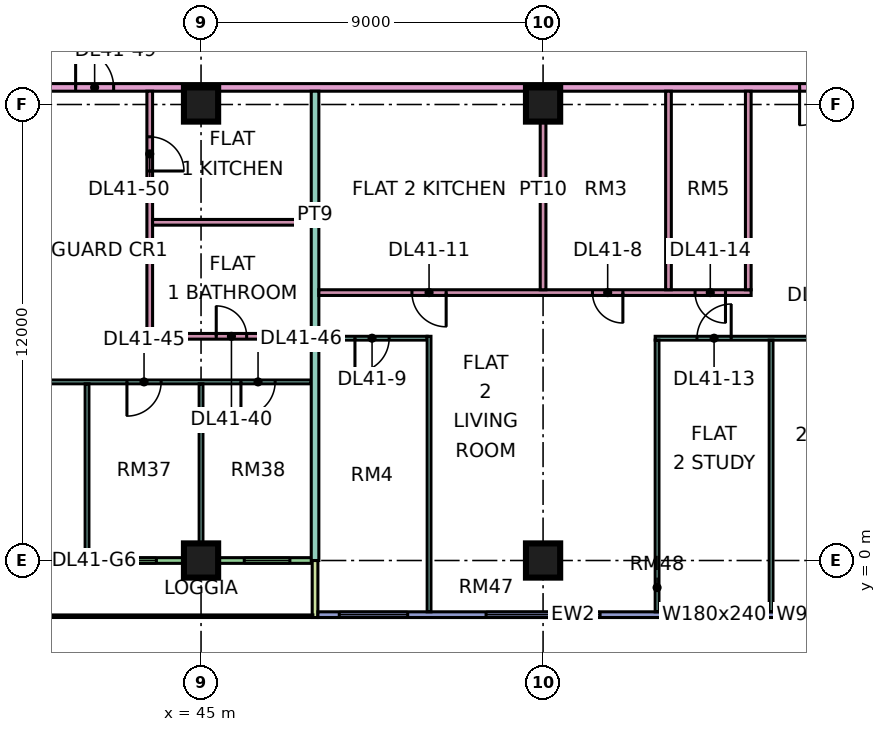
"""IFC4 building model, lengths in metres.
Left out: names, types, materials, properties, quantities, classifications, styles, units other than length and angle.
Written with IfcOpenShell. Run it as: python <this file> out.ifc"""

import sys

from ifc_helpers import new_model, si_unit, direction, frame, frame_2d, origin, origin_2d, place, context, subcontext, project, spatial, rectangle, extrude, element, fill, save


model = new_model("IFC4")
c1 = context("Model", 3, precision=1e-05, world=origin(), true_north=direction((0.0, 1.0)))
c2 = subcontext(c1, "Body", "Model", "MODEL_VIEW")
j1 = project(units=[si_unit("LENGTHUNIT", "METRE"), si_unit("PLANEANGLEUNIT", "RADIAN")], contexts=[c1])
p1 = place(None, origin())
s1 = spatial("IfcSite", under=j1, at=p1, CompositionType="ELEMENT")
p2 = place(p1, origin())
s2 = spatial("IfcBuilding", under=s1, at=p2, CompositionType="ELEMENT")
p3 = place(p2, frame((0.0, 0.0, 179.9)))
s3 = spatial("IfcBuildingStorey", under=s2, at=p3, CompositionType="ELEMENT", Elevation=179.9)
for number, where, z_axis, x_axis in (
    (1, (45.0, 0.0, 0.0), (0.0, 0.0, 1.0), (1.0, 0.0, 0.0)),
    (2, (45.0, 12.0, 0.0), (0.0, 0.0, 1.0), (1.0, 0.0, 0.0)),
    (3, (54.0, 0.0, 0.0), (0.0, 0.0, 1.0), (1.0, 0.0, 0.0)),
    (4, (54.0, 12.0, 0.0), (0.0, 0.0, 1.0), (1.0, 0.0, 0.0)),
):
    element("IfcColumn", number, at=place(p3, frame(where, z_axis=z_axis, x_axis=x_axis)), inside=s3, PredefinedType="COLUMN", context=c2, shape_type="SweptSolid", body=[
        extrude(rectangle(XDim=0.9, YDim=0.9, at=origin_2d()), origin(), (0.0, 0.0, 1.0), 3.75),
    ])
p4 = place(p3, frame((36.075, 0.0, 0.0), z_axis=(0.0, 0.0, 1.0), x_axis=(1.0, 0.0, 0.0)))
e5 = element("IfcWall", 5, at=p4, inside=s3, PredefinedType="SOLIDWALL", context=c2, shape_type="SweptSolid", body=[
    extrude(rectangle(XDim=11.85, YDim=0.15, at=frame_2d((5.925, 0.0))), origin(), (0.0, 0.0, 1.0), 3.35),
])
p5 = place(p4, frame((2.3, 0.0, 0.0)))
e6 = element("IfcOpeningElement", 6, at=p5, cuts=e5, PredefinedType="OPENING", context=c2, shape_type="SweptSolid", body=[
    extrude(rectangle(XDim=1.8, YDim=2.4, at=frame_2d((0.9, 1.2))), frame((0.0, 0.085, 0.0), z_axis=(0.0, -1.0, 0.0), x_axis=(1.0, 0.0, 0.0)), (0.0, 0.0, 1.0), 0.17),
])
p6 = place(p4, frame((6.55, 0.0, 0.45)))
e7 = element("IfcOpeningElement", 7, at=p6, cuts=e5, PredefinedType="OPENING", context=c2, shape_type="SweptSolid", body=[
    extrude(rectangle(XDim=1.2, YDim=2.4, at=frame_2d((0.6, 1.2))), frame((0.0, 0.085, 0.0), z_axis=(0.0, -1.0, 0.0), x_axis=(1.0, 0.0, 0.0)), (0.0, 0.0, 1.0), 0.17),
])
p7 = place(p4, frame((10.062, 0.0, 0.45)))
e8 = element("IfcOpeningElement", 8, at=p7, cuts=e5, PredefinedType="OPENING", context=c2, shape_type="SweptSolid", body=[
    extrude(rectangle(XDim=1.2, YDim=2.4, at=frame_2d((0.6, 1.2))), frame((0.0, 0.085, 0.0), z_axis=(0.0, -1.0, 0.0), x_axis=(1.0, 0.0, 0.0)), (0.0, 0.0, 1.0), 0.17),
])
p8 = place(p3, frame((48.0, -1.5, 0.0), z_axis=(0.0, 0.0, 1.0), x_axis=(0.0, 1.0, 0.0)))
e9 = element("IfcWall", 9, at=p8, inside=s3, PredefinedType="SOLIDWALL", context=c2, shape_type="SweptSolid", body=[
    extrude(rectangle(XDim=1.5, YDim=0.15, at=frame_2d((0.75, 0.0))), origin(), (0.0, 0.0, 1.0), 3.35),
])
p9 = place(p3, frame((48.075, -1.425, 0.0), z_axis=(0.0, 0.0, 1.0), x_axis=(1.0, 0.0, 0.0)))
e10 = element("IfcWall", 10, at=p9, inside=s3, PredefinedType="SOLIDWALL", context=c2, shape_type="SweptSolid", body=[
    extrude(rectangle(XDim=13.425, YDim=0.15, at=frame_2d((6.712, 0.0))), origin(), (0.0, 0.0, 1.0), 3.35),
])
p10 = place(p9, frame((0.562, 0.0, 0.45)))
e11 = element("IfcOpeningElement", 11, at=p10, cuts=e10, PredefinedType="OPENING", context=c2, shape_type="SweptSolid", body=[
    extrude(rectangle(XDim=1.8, YDim=2.4, at=frame_2d((0.9, 1.2))), frame((0.0, 0.085, 0.0), z_axis=(0.0, -1.0, 0.0), x_axis=(1.0, 0.0, 0.0)), (0.0, 0.0, 1.0), 0.17),
])
p11 = place(p9, frame((4.425, 0.0, 0.45)))
e12 = element("IfcOpeningElement", 12, at=p11, cuts=e10, PredefinedType="OPENING", context=c2, shape_type="SweptSolid", body=[
    extrude(rectangle(XDim=3.0, YDim=2.4, at=frame_2d((1.5, 1.2))), frame((0.0, 0.085, 0.0), z_axis=(0.0, -1.0, 0.0), x_axis=(1.0, 0.0, 0.0)), (0.0, 0.0, 1.0), 0.17),
])
p12 = place(p9, frame((9.525, 0.0, 0.45)))
e13 = element("IfcOpeningElement", 13, at=p12, cuts=e10, PredefinedType="OPENING", context=c2, shape_type="SweptSolid", body=[
    extrude(rectangle(XDim=1.8, YDim=2.4, at=frame_2d((0.9, 1.2))), frame((0.0, 0.085, 0.0), z_axis=(0.0, -1.0, 0.0), x_axis=(1.0, 0.0, 0.0)), (0.0, 0.0, 1.0), 0.17),
])
p13 = place(p9, frame((12.225, 0.0, 0.45)))
e14 = element("IfcOpeningElement", 14, at=p13, cuts=e10, PredefinedType="OPENING", context=c2, shape_type="SweptSolid", body=[
    extrude(rectangle(XDim=0.9, YDim=2.4, at=frame_2d((0.45, 1.2))), frame((0.0, 0.085, 0.0), z_axis=(0.0, -1.0, 0.0), x_axis=(1.0, 0.0, 0.0)), (0.0, 0.0, 1.0), 0.17),
])
p14 = place(p3, frame((33.05, 4.7, 0.0), z_axis=(0.0, 0.0, 1.0), x_axis=(1.0, 0.0, 0.0)))
e15 = element("IfcWall", 15, at=p14, inside=s3, PredefinedType="PARTITIONING", context=c2, shape_type="SweptSolid", body=[
    extrude(rectangle(XDim=14.85, YDim=0.1, at=frame_2d((7.425, 0.0))), origin(), (0.0, 0.0, 1.0), 3.35),
])
p15 = place(p14, frame((10.0, 0.0, 0.0)))
e16 = element("IfcOpeningElement", 16, at=p15, cuts=e15, PredefinedType="OPENING", context=c2, shape_type="SweptSolid", body=[
    extrude(rectangle(XDim=0.9, YDim=2.1, at=frame_2d((0.45, 1.05))), frame((0.0, 0.06, 0.0), z_axis=(0.0, -1.0, 0.0), x_axis=(1.0, 0.0, 0.0)), (0.0, 0.0, 1.0), 0.12),
])
p16 = place(p14, frame((13.0, 0.0, 0.0)))
e17 = element("IfcOpeningElement", 17, at=p16, cuts=e15, PredefinedType="OPENING", context=c2, shape_type="SweptSolid", body=[
    extrude(rectangle(XDim=0.9, YDim=2.1, at=frame_2d((0.45, 1.05))), frame((0.0, 0.06, 0.0), z_axis=(0.0, -1.0, 0.0), x_axis=(1.0, 0.0, 0.0)), (0.0, 0.0, 1.0), 0.12),
])
p17 = place(p14, frame((4.0, 0.0, 0.0)))
e18 = element("IfcOpeningElement", 18, at=p17, cuts=e15, PredefinedType="OPENING", context=c2, shape_type="SweptSolid", body=[
    extrude(rectangle(XDim=0.9, YDim=2.1, at=frame_2d((0.45, 1.05))), frame((0.0, 0.06, 0.0), z_axis=(0.0, -1.0, 0.0), x_axis=(1.0, 0.0, 0.0)), (0.0, 0.0, 1.0), 0.12),
])
p18 = place(p3, frame((40.65, 12.45, 0.0), z_axis=(0.0, 0.0, 1.0), x_axis=(1.0, 0.0, 0.0)))
e19 = element("IfcWall", 19, at=p18, inside=s3, PredefinedType="PARTITIONING", context=c2, shape_type="SweptSolid", body=[
    extrude(rectangle(XDim=22.276, YDim=0.2, at=frame_2d((11.138, 0.0))), origin(), (0.0, 0.0, 1.0), 3.35),
])
p19 = place(p18, frame((20.1, 0.0, 0.0)))
e20 = element("IfcOpeningElement", 20, at=p19, cuts=e19, PredefinedType="OPENING", context=c2, shape_type="SweptSolid", body=[
    extrude(rectangle(XDim=1.0, YDim=2.1, at=frame_2d((0.5, 1.05))), frame((0.0, 0.11, 0.0), z_axis=(0.0, -1.0, 0.0), x_axis=(1.0, 0.0, 0.0)), (0.0, 0.0, 1.0), 0.22),
])
p20 = place(p18, frame((1.05, 0.0, 0.0)))
e21 = element("IfcOpeningElement", 21, at=p20, cuts=e19, PredefinedType="OPENING", context=c2, shape_type="SweptSolid", body=[
    extrude(rectangle(XDim=1.0, YDim=2.1, at=frame_2d((0.5, 1.05))), frame((0.0, 0.11, 0.0), z_axis=(0.0, -1.0, 0.0), x_axis=(1.0, 0.0, 0.0)), (0.0, 0.0, 1.0), 0.22),
])
p21 = place(p3, frame((42.0, 0.074, 0.0), z_axis=(0.0, 0.0, 1.0), x_axis=(0.0, 1.0, 0.0)))
e22 = element("IfcWall", 22, at=p21, inside=s3, PredefinedType="PARTITIONING", context=c2, shape_type="SweptSolid", body=[
    extrude(rectangle(XDim=4.576, YDim=0.1, at=frame_2d((2.288, 0.0))), origin(), (0.0, 0.0, 1.0), 3.35),
])
p22 = place(p3, frame((43.65, 5.825, 0.0), z_axis=(0.0, 0.0, 1.0), x_axis=(0.0, 1.0, 0.0)))
e23 = element("IfcWall", 23, at=p22, inside=s3, PredefinedType="PARTITIONING", context=c2, shape_type="SweptSolid", body=[
    extrude(rectangle(XDim=6.525, YDim=0.15, at=frame_2d((3.263, 0.0))), origin(), (0.0, 0.0, 1.0), 3.35),
])
p23 = place(p22, frame((4.425, 0.0, 0.0)))
e24 = element("IfcOpeningElement", 24, at=p23, cuts=e23, PredefinedType="OPENING", context=c2, shape_type="SweptSolid", body=[
    extrude(rectangle(XDim=0.9, YDim=2.1, at=frame_2d((0.45, 1.05))), frame((0.0, 0.085, 0.0), z_axis=(0.0, -1.0, 0.0), x_axis=(1.0, 0.0, 0.0)), (0.0, 0.0, 1.0), 0.17),
])
p24 = place(p3, frame((43.725, 5.9, 0.0), z_axis=(0.0, 0.0, 1.0), x_axis=(1.0, 0.0, 0.0)))
e25 = element("IfcWall", 25, at=p24, inside=s3, PredefinedType="PARTITIONING", context=c2, shape_type="SweptSolid", body=[
    extrude(rectangle(XDim=4.175, YDim=0.15, at=frame_2d((2.087, 0.0))), origin(), (0.0, 0.0, 1.0), 3.35),
])
p25 = place(p24, frame((1.675, 0.0, 0.0)))
e26 = element("IfcOpeningElement", 26, at=p25, cuts=e25, PredefinedType="OPENING", context=c2, shape_type="SweptSolid", body=[
    extrude(rectangle(XDim=0.8, YDim=2.1, at=frame_2d((0.4, 1.05))), frame((0.0, 0.085, 0.0), z_axis=(0.0, -1.0, 0.0), x_axis=(1.0, 0.0, 0.0)), (0.0, 0.0, 1.0), 0.17),
])
p26 = place(p3, frame((43.725, 8.9, 0.0), z_axis=(0.0, 0.0, 1.0), x_axis=(1.0, 0.0, 0.0)))
e27 = element("IfcWall", 27, at=p26, inside=s3, PredefinedType="PARTITIONING", context=c2, shape_type="SweptSolid", body=[
    extrude(rectangle(XDim=4.175, YDim=0.15, at=frame_2d((2.087, 0.0))), origin(), (0.0, 0.0, 1.0), 3.35),
])
p27 = place(p3, frame((45.0, 0.074, 0.0), z_axis=(0.0, 0.0, 1.0), x_axis=(0.0, 1.0, 0.0)))
e28 = element("IfcWall", 28, at=p27, inside=s3, PredefinedType="PARTITIONING", context=c2, shape_type="SweptSolid", body=[
    extrude(rectangle(XDim=4.576, YDim=0.1, at=frame_2d((2.288, 0.0))), origin(), (0.0, 0.0, 1.0), 3.35),
])
p28 = place(p3, frame((48.0, 0.0, 0.0), z_axis=(0.0, 0.0, 1.0), x_axis=(0.0, 1.0, 0.0)))
e29 = element("IfcWall", 29, at=p28, inside=s3, PredefinedType="PARTITIONING", context=c2, shape_type="SweptSolid", body=[
    extrude(rectangle(XDim=5.9, YDim=0.2, at=frame_2d((2.95, 0.0))), origin(), (0.0, 0.0, 1.0), 3.35),
])
p29 = place(p3, frame((48.0, 5.825, 0.0), z_axis=(0.0, 0.0, 1.0), x_axis=(0.0, 1.0, 0.0)))
e30 = element("IfcWall", 30, at=p29, inside=s3, PredefinedType="PARTITIONING", context=c2, shape_type="SweptSolid", body=[
    extrude(rectangle(XDim=6.525, YDim=0.2, at=frame_2d((3.263, 0.0))), origin(), (0.0, 0.0, 1.0), 3.35),
])
p30 = place(p3, frame((48.1, 5.85, 0.0), z_axis=(0.0, 0.0, 1.0), x_axis=(1.0, 0.0, 0.0)))
e31 = element("IfcWall", 31, at=p30, inside=s3, PredefinedType="PARTITIONING", context=c2, shape_type="SweptSolid", body=[
    extrude(rectangle(XDim=2.85, YDim=0.1, at=frame_2d((1.425, 0.0))), origin(), (0.0, 0.0, 1.0), 3.35),
])
p31 = place(p30, frame((0.95, 0.0, 0.0)))
e32 = element("IfcOpeningElement", 32, at=p31, cuts=e31, PredefinedType="OPENING", context=c2, shape_type="SweptSolid", body=[
    extrude(rectangle(XDim=0.9, YDim=2.1, at=frame_2d((0.45, 1.05))), frame((0.0, 0.06, 0.0), z_axis=(0.0, -1.0, 0.0), x_axis=(1.0, 0.0, 0.0)), (0.0, 0.0, 1.0), 0.12),
])
p32 = place(p3, frame((48.1, 7.05, 0.0), z_axis=(0.0, 0.0, 1.0), x_axis=(1.0, 0.0, 0.0)))
e33 = element("IfcWall", 33, at=p32, inside=s3, PredefinedType="PARTITIONING", context=c2, shape_type="SweptSolid", body=[
    extrude(rectangle(XDim=11.375, YDim=0.15, at=frame_2d((5.688, 0.0))), origin(), (0.0, 0.0, 1.0), 3.35),
])
p33 = place(p32, frame((7.2, 0.0, 0.0)))
e34 = element("IfcOpeningElement", 34, at=p33, cuts=e33, PredefinedType="OPENING", context=c2, shape_type="SweptSolid", body=[
    extrude(rectangle(XDim=0.8, YDim=2.1, at=frame_2d((0.4, 1.05))), frame((0.0, 0.085, 0.0), z_axis=(0.0, -1.0, 0.0), x_axis=(1.0, 0.0, 0.0)), (0.0, 0.0, 1.0), 0.17),
])
p34 = place(p32, frame((2.45, 0.0, 0.0)))
e35 = element("IfcOpeningElement", 35, at=p34, cuts=e33, PredefinedType="OPENING", context=c2, shape_type="SweptSolid", body=[
    extrude(rectangle(XDim=0.9, YDim=2.1, at=frame_2d((0.45, 1.05))), frame((0.0, 0.085, 0.0), z_axis=(0.0, -1.0, 0.0), x_axis=(1.0, 0.0, 0.0)), (0.0, 0.0, 1.0), 0.17),
])
p35 = place(p32, frame((9.9, 0.0, 0.0)))
e36 = element("IfcOpeningElement", 36, at=p35, cuts=e33, PredefinedType="OPENING", context=c2, shape_type="SweptSolid", body=[
    extrude(rectangle(XDim=0.8, YDim=2.1, at=frame_2d((0.4, 1.05))), frame((0.0, 0.085, 0.0), z_axis=(0.0, -1.0, 0.0), x_axis=(1.0, 0.0, 0.0)), (0.0, 0.0, 1.0), 0.17),
])
p36 = place(p3, frame((51.0, -1.35, 0.0), z_axis=(0.0, 0.0, 1.0), x_axis=(0.0, 1.0, 0.0)))
e37 = element("IfcWall", 37, at=p36, inside=s3, PredefinedType="PARTITIONING", context=c2, shape_type="SweptSolid", body=[
    extrude(rectangle(XDim=7.25, YDim=0.1, at=frame_2d((3.625, 0.0))), origin(), (0.0, 0.0, 1.0), 3.35),
])
p37 = place(p3, frame((54.0, 7.125, 0.0), z_axis=(0.0, 0.0, 1.0), x_axis=(0.0, 1.0, 0.0)))
e38 = element("IfcWall", 38, at=p37, inside=s3, PredefinedType="PARTITIONING", context=c2, shape_type="SweptSolid", body=[
    extrude(rectangle(XDim=5.225, YDim=0.15, at=frame_2d((2.613, 0.0))), origin(), (0.0, 0.0, 1.0), 3.35),
])
p38 = place(p3, frame((56.95, 5.85, 0.0), z_axis=(0.0, 0.0, 1.0), x_axis=(1.0, 0.0, 0.0)))
e39 = element("IfcWall", 39, at=p38, inside=s3, PredefinedType="PARTITIONING", context=c2, shape_type="SweptSolid", body=[
    extrude(rectangle(XDim=7.4, YDim=0.1, at=frame_2d((3.7, 0.0))), origin(), (0.0, 0.0, 1.0), 3.35),
])
p39 = place(p38, frame((4.1, 0.0, 0.0)))
e40 = element("IfcOpeningElement", 40, at=p39, cuts=e39, PredefinedType="OPENING", context=c2, shape_type="SweptSolid", body=[
    extrude(rectangle(XDim=0.9, YDim=2.1, at=frame_2d((0.45, 1.05))), frame((0.0, 0.06, 0.0), z_axis=(0.0, -1.0, 0.0), x_axis=(1.0, 0.0, 0.0)), (0.0, 0.0, 1.0), 0.12),
])
p40 = place(p38, frame((1.1, 0.0, 0.0)))
e41 = element("IfcOpeningElement", 41, at=p40, cuts=e39, PredefinedType="OPENING", context=c2, shape_type="SweptSolid", body=[
    extrude(rectangle(XDim=0.9, YDim=2.1, at=frame_2d((0.45, 1.05))), frame((0.0, 0.06, 0.0), z_axis=(0.0, -1.0, 0.0), x_axis=(1.0, 0.0, 0.0)), (0.0, 0.0, 1.0), 0.12),
])
p41 = place(p3, frame((57.0, -1.35, 0.0), z_axis=(0.0, 0.0, 1.0), x_axis=(0.0, 1.0, 0.0)))
e42 = element("IfcWall", 42, at=p41, inside=s3, PredefinedType="PARTITIONING", context=c2, shape_type="SweptSolid", body=[
    extrude(rectangle(XDim=7.15, YDim=0.1, at=frame_2d((3.575, 0.0))), origin(), (0.0, 0.0, 1.0), 3.35),
])
for number, where, z_axis, x_axis in (
    (43, (57.3, 7.125, 0.0), (0.0, 0.0, 1.0), (0.0, 1.0, 0.0)),
    (44, (59.4, 7.125, 0.0), (0.0, 0.0, 1.0), (0.0, 1.0, 0.0)),
):
    element("IfcWall", number, at=place(p3, frame(where, z_axis=z_axis, x_axis=x_axis)), inside=s3, PredefinedType="PARTITIONING", context=c2, shape_type="SweptSolid", body=[
        extrude(rectangle(XDim=5.225, YDim=0.15, at=frame_2d((2.613, 0.0))), origin(), (0.0, 0.0, 1.0), 3.35),
    ])
p42 = place(p3, frame((60.0, -1.35, 0.0), z_axis=(0.0, 0.0, 1.0), x_axis=(0.0, 1.0, 0.0)))
e45 = element("IfcWall", 45, at=p42, inside=s3, PredefinedType="PARTITIONING", context=c2, shape_type="SweptSolid", body=[
    extrude(rectangle(XDim=7.15, YDim=0.1, at=frame_2d((3.575, 0.0))), origin(), (0.0, 0.0, 1.0), 3.35),
])
p43 = place(p6, origin())
e46 = element("IfcWindow", 46, at=p43, inside=s3, PartitioningType="SINGLE_PANEL", PredefinedType="WINDOW", context=c2, shape_type="SweptSolid", body=[
    extrude(rectangle(XDim=1.2, YDim=2.4, at=frame_2d((0.6, 1.2))), frame((0.0, 0.03, 0.0), z_axis=(0.0, -1.0, 0.0), x_axis=(1.0, 0.0, 0.0)), (0.0, 0.0, 1.0), 0.06),
])
fill(e7, e46)
p44 = place(p7, origin())
e47 = element("IfcWindow", 47, at=p44, inside=s3, PartitioningType="SINGLE_PANEL", PredefinedType="WINDOW", context=c2, shape_type="SweptSolid", body=[
    extrude(rectangle(XDim=1.2, YDim=2.4, at=frame_2d((0.6, 1.2))), frame((0.0, 0.03, 0.0), z_axis=(0.0, -1.0, 0.0), x_axis=(1.0, 0.0, 0.0)), (0.0, 0.0, 1.0), 0.06),
])
fill(e8, e47)
p45 = place(p10, origin())
e48 = element("IfcWindow", 48, at=p45, inside=s3, PartitioningType="SINGLE_PANEL", PredefinedType="WINDOW", context=c2, shape_type="SweptSolid", body=[
    extrude(rectangle(XDim=1.8, YDim=2.4, at=frame_2d((0.9, 1.2))), frame((0.0, 0.03, 0.0), z_axis=(0.0, -1.0, 0.0), x_axis=(1.0, 0.0, 0.0)), (0.0, 0.0, 1.0), 0.06),
])
fill(e11, e48)
p46 = place(p11, origin())
e49 = element("IfcWindow", 49, at=p46, inside=s3, PartitioningType="SINGLE_PANEL", PredefinedType="WINDOW", context=c2, shape_type="SweptSolid", body=[
    extrude(rectangle(XDim=3.0, YDim=2.4, at=frame_2d((1.5, 1.2))), frame((0.0, 0.03, 0.0), z_axis=(0.0, -1.0, 0.0), x_axis=(1.0, 0.0, 0.0)), (0.0, 0.0, 1.0), 0.06),
])
fill(e12, e49)
p47 = place(p12, origin())
e50 = element("IfcWindow", 50, at=p47, inside=s3, PartitioningType="SINGLE_PANEL", PredefinedType="WINDOW", context=c2, shape_type="SweptSolid", body=[
    extrude(rectangle(XDim=1.8, YDim=2.4, at=frame_2d((0.9, 1.2))), frame((0.0, 0.03, 0.0), z_axis=(0.0, -1.0, 0.0), x_axis=(1.0, 0.0, 0.0)), (0.0, 0.0, 1.0), 0.06),
])
fill(e13, e50)
p48 = place(p13, origin())
e51 = element("IfcWindow", 51, at=p48, inside=s3, PartitioningType="SINGLE_PANEL", PredefinedType="WINDOW", context=c2, shape_type="SweptSolid", body=[
    extrude(rectangle(XDim=0.9, YDim=2.4, at=frame_2d((0.45, 1.2))), frame((0.0, 0.03, 0.0), z_axis=(0.0, -1.0, 0.0), x_axis=(1.0, 0.0, 0.0)), (0.0, 0.0, 1.0), 0.06),
])
fill(e14, e51)
p49 = place(p33, origin())
e52 = element("IfcDoor", 52, at=p49, inside=s3, OperationType="SINGLE_SWING_RIGHT", PredefinedType="DOOR", context=c2, shape_type="SweptSolid", body=[
    extrude(rectangle(XDim=0.8, YDim=2.1, at=frame_2d((0.4, 1.05))), frame((0.0, 0.025, 0.0), z_axis=(0.0, -1.0, 0.0), x_axis=(1.0, 0.0, 0.0)), (0.0, 0.0, 1.0), 0.05),
])
fill(e34, e52)
p50 = place(p31, frame((0.9, 0.0, 0.0), z_axis=(0.0, 0.0, 1.0), x_axis=(-1.0, 0.0, 0.0)))
e53 = element("IfcDoor", 53, at=p50, inside=s3, OperationType="SINGLE_SWING_LEFT", PredefinedType="DOOR", context=c2, shape_type="SweptSolid", body=[
    extrude(rectangle(XDim=0.9, YDim=2.1, at=frame_2d((0.45, 1.05))), frame((0.0, 0.025, 0.0), z_axis=(0.0, -1.0, 0.0), x_axis=(1.0, 0.0, 0.0)), (0.0, 0.0, 1.0), 0.05),
])
fill(e32, e53)
p51 = place(p34, origin())
e54 = element("IfcDoor", 54, at=p51, inside=s3, OperationType="SINGLE_SWING_RIGHT", PredefinedType="DOOR", context=c2, shape_type="SweptSolid", body=[
    extrude(rectangle(XDim=0.9, YDim=2.1, at=frame_2d((0.45, 1.05))), frame((0.0, 0.025, 0.0), z_axis=(0.0, -1.0, 0.0), x_axis=(1.0, 0.0, 0.0)), (0.0, 0.0, 1.0), 0.05),
])
fill(e35, e54)
p52 = place(p19, frame((1.0, 0.0, 0.0), z_axis=(0.0, 0.0, 1.0), x_axis=(-1.0, 0.0, 0.0)))
e55 = element("IfcDoor", 55, at=p52, inside=s3, OperationType="SINGLE_SWING_LEFT", PredefinedType="DOOR", context=c2, shape_type="SweptSolid", body=[
    extrude(rectangle(XDim=1.0, YDim=2.1, at=frame_2d((0.5, 1.05))), frame((0.0, 0.025, 0.0), z_axis=(0.0, -1.0, 0.0), x_axis=(1.0, 0.0, 0.0)), (0.0, 0.0, 1.0), 0.05),
])
fill(e20, e55)
p53 = place(p40, frame((0.9, 0.0, 0.0), z_axis=(0.0, 0.0, 1.0), x_axis=(-1.0, 0.0, 0.0)))
e56 = element("IfcDoor", 56, at=p53, inside=s3, OperationType="SINGLE_SWING_RIGHT", PredefinedType="DOOR", context=c2, shape_type="SweptSolid", body=[
    extrude(rectangle(XDim=0.9, YDim=2.1, at=frame_2d((0.45, 1.05))), frame((0.0, 0.025, 0.0), z_axis=(0.0, -1.0, 0.0), x_axis=(1.0, 0.0, 0.0)), (0.0, 0.0, 1.0), 0.05),
])
fill(e41, e56)
p54 = place(p35, origin())
e57 = element("IfcDoor", 57, at=p54, inside=s3, OperationType="SINGLE_SWING_RIGHT", PredefinedType="DOOR", context=c2, shape_type="SweptSolid", body=[
    extrude(rectangle(XDim=0.8, YDim=2.1, at=frame_2d((0.4, 1.05))), frame((0.0, 0.025, 0.0), z_axis=(0.0, -1.0, 0.0), x_axis=(1.0, 0.0, 0.0)), (0.0, 0.0, 1.0), 0.05),
])
fill(e36, e57)
p55 = place(p25, origin())
e58 = element("IfcDoor", 58, at=p55, inside=s3, OperationType="SINGLE_SWING_LEFT", PredefinedType="DOOR", context=c2, shape_type="SweptSolid", body=[
    extrude(rectangle(XDim=0.8, YDim=2.1, at=frame_2d((0.4, 1.05))), frame((0.0, 0.025, 0.0), z_axis=(0.0, -1.0, 0.0), x_axis=(1.0, 0.0, 0.0)), (0.0, 0.0, 1.0), 0.05),
])
fill(e26, e58)
p56 = place(p15, frame((0.9, 0.0, 0.0), z_axis=(0.0, 0.0, 1.0), x_axis=(-1.0, 0.0, 0.0)))
e59 = element("IfcDoor", 59, at=p56, inside=s3, OperationType="SINGLE_SWING_LEFT", PredefinedType="DOOR", context=c2, shape_type="SweptSolid", body=[
    extrude(rectangle(XDim=0.9, YDim=2.1, at=frame_2d((0.45, 1.05))), frame((0.0, 0.025, 0.0), z_axis=(0.0, -1.0, 0.0), x_axis=(1.0, 0.0, 0.0)), (0.0, 0.0, 1.0), 0.05),
])
fill(e16, e59)
p57 = place(p16, frame((0.9, 0.0, 0.0), z_axis=(0.0, 0.0, 1.0), x_axis=(-1.0, 0.0, 0.0)))
e60 = element("IfcDoor", 60, at=p57, inside=s3, OperationType="SINGLE_SWING_LEFT", PredefinedType="DOOR", context=c2, shape_type="SweptSolid", body=[
    extrude(rectangle(XDim=0.9, YDim=2.1, at=frame_2d((0.45, 1.05))), frame((0.0, 0.025, 0.0), z_axis=(0.0, -1.0, 0.0), x_axis=(1.0, 0.0, 0.0)), (0.0, 0.0, 1.0), 0.05),
])
fill(e17, e60)
p58 = place(p20, origin())
e61 = element("IfcDoor", 61, at=p58, inside=s3, OperationType="SINGLE_SWING_LEFT", PredefinedType="DOOR", context=c2, shape_type="SweptSolid", body=[
    extrude(rectangle(XDim=1.0, YDim=2.1, at=frame_2d((0.5, 1.05))), frame((0.0, 0.025, 0.0), z_axis=(0.0, -1.0, 0.0), x_axis=(1.0, 0.0, 0.0)), (0.0, 0.0, 1.0), 0.05),
])
fill(e21, e61)
p59 = place(p23, frame((0.9, 0.0, 0.0), z_axis=(0.0, 0.0, 1.0), x_axis=(-1.0, 0.0, 0.0)))
e62 = element("IfcDoor", 62, at=p59, inside=s3, OperationType="SINGLE_SWING_LEFT", PredefinedType="DOOR", context=c2, shape_type="SweptSolid", body=[
    extrude(rectangle(XDim=0.9, YDim=2.1, at=frame_2d((0.45, 1.05))), frame((0.0, 0.025, 0.0), z_axis=(0.0, -1.0, 0.0), x_axis=(1.0, 0.0, 0.0)), (0.0, 0.0, 1.0), 0.05),
])
fill(e24, e62)
save(model, sys.argv[1])
